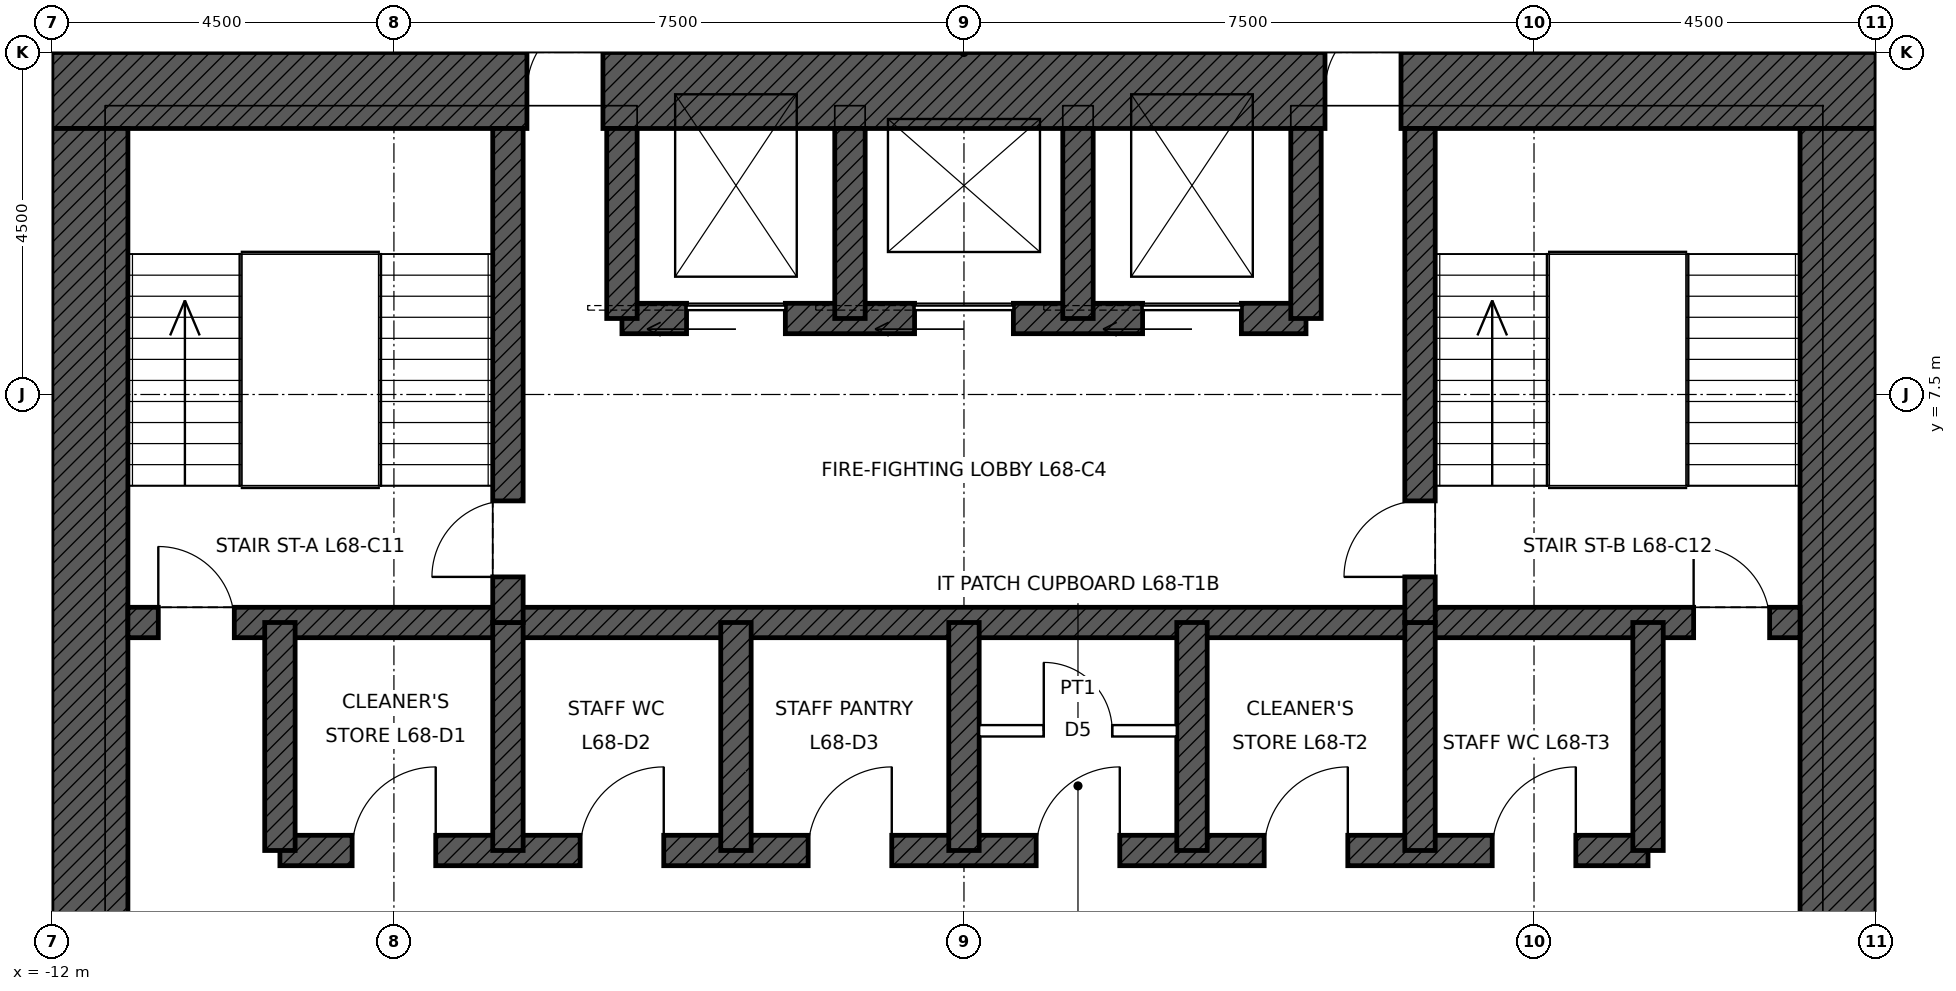
"""IFC4 building model, lengths in metres.
Left out: names, types, materials, properties, quantities, classifications, styles, units other than length and angle.
Written with IfcOpenShell. Run it as: python <this file> out.ifc"""

import sys

from ifc_helpers import new_model, si_unit, direction, frame, frame_2d, origin, place, context, subcontext, project, spatial, rectangle, extrude, element, fill, save


model = new_model("IFC4")
c1 = context("Model", 3, precision=1e-05, world=origin(), true_north=direction((0.0, 1.0)))
c2 = subcontext(c1, "Body", "Model", "MODEL_VIEW")
j1 = project(units=[si_unit("LENGTHUNIT", "METRE"), si_unit("PLANEANGLEUNIT", "RADIAN")], contexts=[c1])
p1 = place(None, origin())
s1 = spatial("IfcSite", under=j1, at=p1, CompositionType="ELEMENT")
p2 = place(p1, origin())
s2 = spatial("IfcBuilding", under=s1, at=p2, CompositionType="ELEMENT")
p3 = place(p2, frame((0.0, 0.0, 307.9)))
s3 = spatial("IfcBuildingStorey", under=s2, at=p3, CompositionType="ELEMENT", Elevation=307.9)
p4 = place(p3, frame((-12.0, 11.5, 0.0), z_axis=(0.0, 0.0, 1.0), x_axis=(1.0, 0.0, 0.0)))
e1 = element("IfcWall", 1, at=p4, inside=s3, PredefinedType="SHEAR", context=c2, shape_type="SweptSolid", body=[
    extrude(rectangle(XDim=24.0, YDim=1.0, at=frame_2d((12.0, 0.0))), origin(), (0.0, 0.0, 1.0), 4.0),
])
p5 = place(p4, frame((6.25, 0.0, 0.0)))
e2 = element("IfcOpeningElement", 2, at=p5, cuts=e1, PredefinedType="OPENING", context=c2, shape_type="SweptSolid", body=[
    extrude(rectangle(XDim=1.0, YDim=2.4, at=frame_2d((0.5, 1.2))), frame((0.0, 0.51, 0.0), z_axis=(0.0, -1.0, 0.0), x_axis=(1.0, 0.0, 0.0)), (0.0, 0.0, 1.0), 1.02),
])
p6 = place(p4, frame((16.75, 0.0, 0.0)))
e3 = element("IfcOpeningElement", 3, at=p6, cuts=e1, PredefinedType="OPENING", context=c2, shape_type="SweptSolid", body=[
    extrude(rectangle(XDim=1.0, YDim=2.4, at=frame_2d((0.5, 1.2))), frame((0.0, 0.51, 0.0), z_axis=(0.0, -1.0, 0.0), x_axis=(1.0, 0.0, 0.0)), (0.0, 0.0, 1.0), 1.02),
])
p7 = place(p3, frame((11.5, 11.0, 0.0), z_axis=(0.0, 0.0, 1.0), x_axis=(0.0, -1.0, 0.0)))
e4 = element("IfcWall", 4, at=p7, inside=s3, PredefinedType="SHEAR", context=c2, shape_type="SweptSolid", body=[
    extrude(rectangle(XDim=22.0, YDim=1.0, at=frame_2d((11.0, 0.0))), origin(), (0.0, 0.0, 1.0), 4.0),
])
p8 = place(p7, frame((10.5, 0.0, 0.0)))
e5 = element("IfcOpeningElement", 5, at=p8, cuts=e4, PredefinedType="OPENING", context=c2, shape_type="SweptSolid", body=[
    extrude(rectangle(XDim=1.0, YDim=2.4, at=frame_2d((0.5, 1.2))), frame((0.0, 0.51, 0.0), z_axis=(0.0, -1.0, 0.0), x_axis=(1.0, 0.0, 0.0)), (0.0, 0.0, 1.0), 1.02),
])
p9 = place(p3, frame((-11.5, -11.0, 0.0), z_axis=(0.0, 0.0, 1.0), x_axis=(0.0, 1.0, 0.0)))
e6 = element("IfcWall", 6, at=p9, inside=s3, PredefinedType="SHEAR", context=c2, shape_type="SweptSolid", body=[
    extrude(rectangle(XDim=22.0, YDim=1.0, at=frame_2d((11.0, 0.0))), origin(), (0.0, 0.0, 1.0), 4.0),
])
p10 = place(p9, frame((10.5, 0.0, 0.0)))
e7 = element("IfcOpeningElement", 7, at=p10, cuts=e6, PredefinedType="OPENING", context=c2, shape_type="SweptSolid", body=[
    extrude(rectangle(XDim=1.0, YDim=2.4, at=frame_2d((0.5, 1.2))), frame((0.0, 0.51, 0.0), z_axis=(0.0, -1.0, 0.0), x_axis=(1.0, 0.0, 0.0)), (0.0, 0.0, 1.0), 1.02),
])
p11 = place(p3, frame((-11.0, 4.5, 0.0), z_axis=(0.0, 0.0, 1.0), x_axis=(1.0, 0.0, 0.0)))
e8 = element("IfcWall", 8, at=p11, inside=s3, PredefinedType="SHEAR", context=c2, shape_type="SweptSolid", body=[
    extrude(rectangle(XDim=22.0, YDim=0.4, at=frame_2d((11.0, 0.0))), origin(), (0.0, 0.0, 1.0), 4.0),
])
p12 = place(p11, frame((0.4, 0.0, 0.0)))
e9 = element("IfcOpeningElement", 9, at=p12, cuts=e8, PredefinedType="OPENING", context=c2, shape_type="SweptSolid", body=[
    extrude(rectangle(XDim=1.0, YDim=2.1, at=frame_2d((0.5, 1.05))), frame((0.0, 0.21, 0.0), z_axis=(0.0, -1.0, 0.0), x_axis=(1.0, 0.0, 0.0)), (0.0, 0.0, 1.0), 0.42),
])
p13 = place(p11, frame((20.6, 0.0, 0.0)))
e10 = element("IfcOpeningElement", 10, at=p13, cuts=e8, PredefinedType="OPENING", context=c2, shape_type="SweptSolid", body=[
    extrude(rectangle(XDim=1.0, YDim=2.1, at=frame_2d((0.5, 1.05))), frame((0.0, 0.21, 0.0), z_axis=(0.0, -1.0, 0.0), x_axis=(1.0, 0.0, 0.0)), (0.0, 0.0, 1.0), 0.42),
])
p14 = place(p3, frame((-9.0, 1.5, 0.0), z_axis=(0.0, 0.0, 1.0), x_axis=(1.0, 0.0, 0.0)))
e11 = element("IfcWall", 11, at=p14, inside=s3, PredefinedType="SHEAR", context=c2, shape_type="SweptSolid", body=[
    extrude(rectangle(XDim=18.0, YDim=0.4, at=frame_2d((9.0, 0.0))), origin(), (0.0, 0.0, 1.0), 4.0),
])
p15 = place(p14, frame((0.95, 0.0, 0.0)))
e12 = element("IfcOpeningElement", 12, at=p15, cuts=e11, PredefinedType="OPENING", context=c2, shape_type="SweptSolid", body=[
    extrude(rectangle(XDim=1.1, YDim=2.1, at=frame_2d((0.55, 1.05))), frame((0.0, 0.21, 0.0), z_axis=(0.0, -1.0, 0.0), x_axis=(1.0, 0.0, 0.0)), (0.0, 0.0, 1.0), 0.42),
])
p16 = place(p14, frame((3.95, 0.0, 0.0)))
e13 = element("IfcOpeningElement", 13, at=p16, cuts=e11, PredefinedType="OPENING", context=c2, shape_type="SweptSolid", body=[
    extrude(rectangle(XDim=1.1, YDim=2.1, at=frame_2d((0.55, 1.05))), frame((0.0, 0.21, 0.0), z_axis=(0.0, -1.0, 0.0), x_axis=(1.0, 0.0, 0.0)), (0.0, 0.0, 1.0), 0.42),
])
p17 = place(p14, frame((6.95, 0.0, 0.0)))
e14 = element("IfcOpeningElement", 14, at=p17, cuts=e11, PredefinedType="OPENING", context=c2, shape_type="SweptSolid", body=[
    extrude(rectangle(XDim=1.1, YDim=2.1, at=frame_2d((0.55, 1.05))), frame((0.0, 0.21, 0.0), z_axis=(0.0, -1.0, 0.0), x_axis=(1.0, 0.0, 0.0)), (0.0, 0.0, 1.0), 0.42),
])
p18 = place(p14, frame((9.95, 0.0, 0.0)))
e15 = element("IfcOpeningElement", 15, at=p18, cuts=e11, PredefinedType="OPENING", context=c2, shape_type="SweptSolid", body=[
    extrude(rectangle(XDim=1.1, YDim=2.1, at=frame_2d((0.55, 1.05))), frame((0.0, 0.21, 0.0), z_axis=(0.0, -1.0, 0.0), x_axis=(1.0, 0.0, 0.0)), (0.0, 0.0, 1.0), 0.42),
])
p19 = place(p14, frame((12.95, 0.0, 0.0)))
e16 = element("IfcOpeningElement", 16, at=p19, cuts=e11, PredefinedType="OPENING", context=c2, shape_type="SweptSolid", body=[
    extrude(rectangle(XDim=1.1, YDim=2.1, at=frame_2d((0.55, 1.05))), frame((0.0, 0.21, 0.0), z_axis=(0.0, -1.0, 0.0), x_axis=(1.0, 0.0, 0.0)), (0.0, 0.0, 1.0), 0.42),
])
p20 = place(p14, frame((15.95, 0.0, 0.0)))
e17 = element("IfcOpeningElement", 17, at=p20, cuts=e11, PredefinedType="OPENING", context=c2, shape_type="SweptSolid", body=[
    extrude(rectangle(XDim=1.1, YDim=2.1, at=frame_2d((0.55, 1.05))), frame((0.0, 0.21, 0.0), z_axis=(0.0, -1.0, 0.0), x_axis=(1.0, 0.0, 0.0)), (0.0, 0.0, 1.0), 0.42),
])
p21 = place(p3, frame((-4.5, 8.5, 0.0), z_axis=(0.0, 0.0, 1.0), x_axis=(1.0, 0.0, 0.0)))
e18 = element("IfcWall", 18, at=p21, inside=s3, PredefinedType="SHEAR", context=c2, shape_type="SweptSolid", body=[
    extrude(rectangle(XDim=9.0, YDim=0.4, at=frame_2d((4.5, 0.0))), origin(), (0.0, 0.0, 1.0), 4.0),
])
p22 = place(p21, frame((0.85, 0.0, 0.0)))
e19 = element("IfcOpeningElement", 19, at=p22, cuts=e18, PredefinedType="OPENING", context=c2, shape_type="SweptSolid", body=[
    extrude(rectangle(XDim=1.3, YDim=2.4, at=frame_2d((0.65, 1.2))), frame((0.0, 0.21, 0.0), z_axis=(0.0, -1.0, 0.0), x_axis=(1.0, 0.0, 0.0)), (0.0, 0.0, 1.0), 0.42),
])
p23 = place(p21, frame((6.85, 0.0, 0.0)))
e20 = element("IfcOpeningElement", 20, at=p23, cuts=e18, PredefinedType="OPENING", context=c2, shape_type="SweptSolid", body=[
    extrude(rectangle(XDim=1.3, YDim=2.4, at=frame_2d((0.65, 1.2))), frame((0.0, 0.21, 0.0), z_axis=(0.0, -1.0, 0.0), x_axis=(1.0, 0.0, 0.0)), (0.0, 0.0, 1.0), 0.42),
])
p24 = place(p21, frame((3.85, 0.0, 0.0)))
e21 = element("IfcOpeningElement", 21, at=p24, cuts=e18, PredefinedType="OPENING", context=c2, shape_type="SweptSolid", body=[
    extrude(rectangle(XDim=1.3, YDim=2.4, at=frame_2d((0.65, 1.2))), frame((0.0, 0.21, 0.0), z_axis=(0.0, -1.0, 0.0), x_axis=(1.0, 0.0, 0.0)), (0.0, 0.0, 1.0), 0.42),
])
for number, where, z_axis, x_axis in (
    (22, (-9.0, 1.5, 0.0), (0.0, 0.0, 1.0), (0.0, 1.0, 0.0)),
    (23, (9.0, 1.5, 0.0), (0.0, 0.0, 1.0), (0.0, 1.0, 0.0)),
    (24, (-6.0, 1.5, 0.0), (0.0, 0.0, 1.0), (0.0, 1.0, 0.0)),
    (25, (-3.0, 1.5, 0.0), (0.0, 0.0, 1.0), (0.0, 1.0, 0.0)),
    (26, (0.0, 1.5, 0.0), (0.0, 0.0, 1.0), (0.0, 1.0, 0.0)),
    (27, (3.0, 1.5, 0.0), (0.0, 0.0, 1.0), (0.0, 1.0, 0.0)),
    (28, (6.0, 1.5, 0.0), (0.0, 0.0, 1.0), (0.0, 1.0, 0.0)),
):
    element("IfcWall", number, at=place(p3, frame(where, z_axis=z_axis, x_axis=x_axis)), inside=s3, PredefinedType="SHEAR", context=c2, shape_type="SweptSolid", body=[
        extrude(rectangle(XDim=3.0, YDim=0.4, at=frame_2d((1.5, 0.0))), origin(), (0.0, 0.0, 1.0), 4.0),
    ])
p25 = place(p3, frame((-6.0, 4.5, 0.0), z_axis=(0.0, 0.0, 1.0), x_axis=(0.0, 1.0, 0.0)))
e29 = element("IfcWall", 29, at=p25, inside=s3, PredefinedType="SHEAR", context=c2, shape_type="SweptSolid", body=[
    extrude(rectangle(XDim=6.5, YDim=0.4, at=frame_2d((3.25, 0.0))), origin(), (0.0, 0.0, 1.0), 4.0),
])
p26 = place(p25, frame((0.6, 0.0, 0.0)))
e30 = element("IfcOpeningElement", 30, at=p26, cuts=e29, PredefinedType="OPENING", context=c2, shape_type="SweptSolid", body=[
    extrude(rectangle(XDim=1.0, YDim=2.1, at=frame_2d((0.5, 1.05))), frame((0.0, 0.21, 0.0), z_axis=(0.0, -1.0, 0.0), x_axis=(1.0, 0.0, 0.0)), (0.0, 0.0, 1.0), 0.42),
])
p27 = place(p3, frame((6.0, 4.5, 0.0), z_axis=(0.0, 0.0, 1.0), x_axis=(0.0, 1.0, 0.0)))
e31 = element("IfcWall", 31, at=p27, inside=s3, PredefinedType="SHEAR", context=c2, shape_type="SweptSolid", body=[
    extrude(rectangle(XDim=6.5, YDim=0.4, at=frame_2d((3.25, 0.0))), origin(), (0.0, 0.0, 1.0), 4.0),
])
p28 = place(p27, frame((0.6, 0.0, 0.0)))
e32 = element("IfcOpeningElement", 32, at=p28, cuts=e31, PredefinedType="OPENING", context=c2, shape_type="SweptSolid", body=[
    extrude(rectangle(XDim=1.0, YDim=2.1, at=frame_2d((0.5, 1.05))), frame((0.0, 0.21, 0.0), z_axis=(0.0, -1.0, 0.0), x_axis=(1.0, 0.0, 0.0)), (0.0, 0.0, 1.0), 0.42),
])
for number, where, z_axis, x_axis in (
    (33, (-4.5, 8.5, 0.0), (0.0, 0.0, 1.0), (0.0, 1.0, 0.0)),
    (34, (4.5, 8.5, 0.0), (0.0, 0.0, 1.0), (0.0, 1.0, 0.0)),
    (35, (-1.5, 8.5, 0.0), (0.0, 0.0, 1.0), (0.0, 1.0, 0.0)),
    (36, (1.5, 8.5, 0.0), (0.0, 0.0, 1.0), (0.0, 1.0, 0.0)),
):
    element("IfcWall", number, at=place(p3, frame(where, z_axis=z_axis, x_axis=x_axis)), inside=s3, PredefinedType="SHEAR", context=c2, shape_type="SweptSolid", body=[
        extrude(rectangle(XDim=2.5, YDim=0.4, at=frame_2d((1.25, 0.0))), origin(), (0.0, 0.0, 1.0), 4.0),
    ])
p29 = place(p3, frame((-13.575, 12.0, 0.0), z_axis=(0.0, 0.0, 1.0), x_axis=(1.0, 0.0, 0.0)))
e37 = element("IfcWall", 37, at=p29, inside=s3, PredefinedType="PARTITIONING", context=c2, shape_type="SweptSolid", body=[
    extrude(rectangle(XDim=1.575, YDim=0.15, at=frame_2d((0.788, 0.0))), origin(), (0.0, 0.0, 1.0), 3.85),
])
p30 = place(p3, frame((0.2, 3.075, 0.0), z_axis=(0.0, 0.0, 1.0), x_axis=(1.0, 0.0, 0.0)))
e38 = element("IfcWall", 38, at=p30, inside=s3, PredefinedType="PARTITIONING", context=c2, shape_type="SweptSolid", body=[
    extrude(rectangle(XDim=2.6, YDim=0.15, at=frame_2d((1.3, 0.0))), origin(), (0.0, 0.0, 1.0), 3.75),
])
p31 = place(p30, frame((0.85, 0.0, 0.0)))
e39 = element("IfcOpeningElement", 39, at=p31, cuts=e38, PredefinedType="OPENING", context=c2, shape_type="SweptSolid", body=[
    extrude(rectangle(XDim=0.9, YDim=2.1, at=frame_2d((0.45, 1.05))), frame((0.0, 0.085, 0.0), z_axis=(0.0, -1.0, 0.0), x_axis=(1.0, 0.0, 0.0)), (0.0, 0.0, 1.0), 0.17),
])
p32 = place(p12, origin())
e40 = element("IfcDoor", 40, at=p32, inside=s3, OperationType="SINGLE_SWING_LEFT", PredefinedType="DOOR", context=c2, shape_type="SweptSolid", body=[
    extrude(rectangle(XDim=1.0, YDim=2.1, at=frame_2d((0.5, 1.05))), frame((0.0, 0.025, 0.0), z_axis=(0.0, -1.0, 0.0), x_axis=(1.0, 0.0, 0.0)), (0.0, 0.0, 1.0), 0.05),
])
fill(e9, e40)
p33 = place(p13, origin())
e41 = element("IfcDoor", 41, at=p33, inside=s3, OperationType="SINGLE_SWING_LEFT", PredefinedType="DOOR", context=c2, shape_type="SweptSolid", body=[
    extrude(rectangle(XDim=1.0, YDim=2.1, at=frame_2d((0.5, 1.05))), frame((0.0, 0.025, 0.0), z_axis=(0.0, -1.0, 0.0), x_axis=(1.0, 0.0, 0.0)), (0.0, 0.0, 1.0), 0.05),
])
fill(e10, e41)
p34 = place(p26, origin())
e42 = element("IfcDoor", 42, at=p34, inside=s3, OperationType="SINGLE_SWING_LEFT", PredefinedType="DOOR", context=c2, shape_type="SweptSolid", body=[
    extrude(rectangle(XDim=1.0, YDim=2.1, at=frame_2d((0.5, 1.05))), frame((0.0, 0.025, 0.0), z_axis=(0.0, -1.0, 0.0), x_axis=(1.0, 0.0, 0.0)), (0.0, 0.0, 1.0), 0.05),
])
fill(e30, e42)
p35 = place(p28, origin())
e43 = element("IfcDoor", 43, at=p35, inside=s3, OperationType="SINGLE_SWING_LEFT", PredefinedType="DOOR", context=c2, shape_type="SweptSolid", body=[
    extrude(rectangle(XDim=1.0, YDim=2.1, at=frame_2d((0.5, 1.05))), frame((0.0, 0.025, 0.0), z_axis=(0.0, -1.0, 0.0), x_axis=(1.0, 0.0, 0.0)), (0.0, 0.0, 1.0), 0.05),
])
fill(e32, e43)
p36 = place(p5, origin())
e44 = element("IfcDoor", 44, at=p36, inside=s3, OperationType="SINGLE_SWING_RIGHT", PredefinedType="DOOR", context=c2, shape_type="SweptSolid", body=[
    extrude(rectangle(XDim=1.0, YDim=2.4, at=frame_2d((0.5, 1.2))), frame((0.0, 0.485, 0.0), z_axis=(0.0, -1.0, 0.0), x_axis=(1.0, 0.0, 0.0)), (0.0, 0.0, 1.0), 0.05),
])
fill(e2, e44)
p37 = place(p6, origin())
e45 = element("IfcDoor", 45, at=p37, inside=s3, OperationType="SINGLE_SWING_RIGHT", PredefinedType="DOOR", context=c2, shape_type="SweptSolid", body=[
    extrude(rectangle(XDim=1.0, YDim=2.4, at=frame_2d((0.5, 1.2))), frame((0.0, 0.485, 0.0), z_axis=(0.0, -1.0, 0.0), x_axis=(1.0, 0.0, 0.0)), (0.0, 0.0, 1.0), 0.05),
])
fill(e3, e45)
p38 = place(p22, origin())
e46 = element("IfcDoor", 46, at=p38, inside=s3, OperationType="SLIDING_TO_LEFT", PredefinedType="DOOR", context=c2, shape_type="SweptSolid", body=[
    extrude(rectangle(XDim=1.3, YDim=2.4, at=frame_2d((0.65, 1.2))), frame((0.0, 0.025, 0.0), z_axis=(0.0, -1.0, 0.0), x_axis=(1.0, 0.0, 0.0)), (0.0, 0.0, 1.0), 0.05),
])
fill(e19, e46)
p39 = place(p23, origin())
e47 = element("IfcDoor", 47, at=p39, inside=s3, OperationType="SLIDING_TO_LEFT", PredefinedType="DOOR", context=c2, shape_type="SweptSolid", body=[
    extrude(rectangle(XDim=1.3, YDim=2.4, at=frame_2d((0.65, 1.2))), frame((0.0, 0.025, 0.0), z_axis=(0.0, -1.0, 0.0), x_axis=(1.0, 0.0, 0.0)), (0.0, 0.0, 1.0), 0.05),
])
fill(e20, e47)
p40 = place(p24, origin())
e48 = element("IfcDoor", 48, at=p40, inside=s3, OperationType="SLIDING_TO_LEFT", PredefinedType="DOOR", context=c2, shape_type="SweptSolid", body=[
    extrude(rectangle(XDim=1.3, YDim=2.4, at=frame_2d((0.65, 1.2))), frame((0.0, 0.025, 0.0), z_axis=(0.0, -1.0, 0.0), x_axis=(1.0, 0.0, 0.0)), (0.0, 0.0, 1.0), 0.05),
])
fill(e21, e48)
p41 = place(p15, origin())
e49 = element("IfcDoor", 49, at=p41, inside=s3, OperationType="SINGLE_SWING_RIGHT", PredefinedType="DOOR", context=c2, shape_type="SweptSolid", body=[
    extrude(rectangle(XDim=1.1, YDim=2.1, at=frame_2d((0.55, 1.05))), frame((0.0, 0.025, 0.0), z_axis=(0.0, -1.0, 0.0), x_axis=(1.0, 0.0, 0.0)), (0.0, 0.0, 1.0), 0.05),
])
fill(e12, e49)
p42 = place(p16, origin())
e50 = element("IfcDoor", 50, at=p42, inside=s3, OperationType="SINGLE_SWING_RIGHT", PredefinedType="DOOR", context=c2, shape_type="SweptSolid", body=[
    extrude(rectangle(XDim=1.1, YDim=2.1, at=frame_2d((0.55, 1.05))), frame((0.0, 0.025, 0.0), z_axis=(0.0, -1.0, 0.0), x_axis=(1.0, 0.0, 0.0)), (0.0, 0.0, 1.0), 0.05),
])
fill(e13, e50)
p43 = place(p17, origin())
e51 = element("IfcDoor", 51, at=p43, inside=s3, OperationType="SINGLE_SWING_RIGHT", PredefinedType="DOOR", context=c2, shape_type="SweptSolid", body=[
    extrude(rectangle(XDim=1.1, YDim=2.1, at=frame_2d((0.55, 1.05))), frame((0.0, 0.025, 0.0), z_axis=(0.0, -1.0, 0.0), x_axis=(1.0, 0.0, 0.0)), (0.0, 0.0, 1.0), 0.05),
])
fill(e14, e51)
p44 = place(p18, origin())
e52 = element("IfcDoor", 52, at=p44, inside=s3, OperationType="SINGLE_SWING_RIGHT", PredefinedType="DOOR", context=c2, shape_type="SweptSolid", body=[
    extrude(rectangle(XDim=1.1, YDim=2.1, at=frame_2d((0.55, 1.05))), frame((0.0, 0.025, 0.0), z_axis=(0.0, -1.0, 0.0), x_axis=(1.0, 0.0, 0.0)), (0.0, 0.0, 1.0), 0.05),
])
fill(e15, e52)
p45 = place(p31, origin())
e53 = element("IfcDoor", 53, at=p45, inside=s3, OperationType="SINGLE_SWING_LEFT", PredefinedType="DOOR", context=c2, shape_type="SweptSolid", body=[
    extrude(rectangle(XDim=0.9, YDim=2.1, at=frame_2d((0.45, 1.05))), frame((0.0, 0.025, 0.0), z_axis=(0.0, -1.0, 0.0), x_axis=(1.0, 0.0, 0.0)), (0.0, 0.0, 1.0), 0.05),
])
fill(e39, e53)
p46 = place(p19, origin())
e54 = element("IfcDoor", 54, at=p46, inside=s3, OperationType="SINGLE_SWING_RIGHT", PredefinedType="DOOR", context=c2, shape_type="SweptSolid", body=[
    extrude(rectangle(XDim=1.1, YDim=2.1, at=frame_2d((0.55, 1.05))), frame((0.0, 0.025, 0.0), z_axis=(0.0, -1.0, 0.0), x_axis=(1.0, 0.0, 0.0)), (0.0, 0.0, 1.0), 0.05),
])
fill(e16, e54)
p47 = place(p20, origin())
e55 = element("IfcDoor", 55, at=p47, inside=s3, OperationType="SINGLE_SWING_RIGHT", PredefinedType="DOOR", context=c2, shape_type="SweptSolid", body=[
    extrude(rectangle(XDim=1.1, YDim=2.1, at=frame_2d((0.55, 1.05))), frame((0.0, 0.025, 0.0), z_axis=(0.0, -1.0, 0.0), x_axis=(1.0, 0.0, 0.0)), (0.0, 0.0, 1.0), 0.05),
])
fill(e17, e55)
save(model, sys.argv[1])
